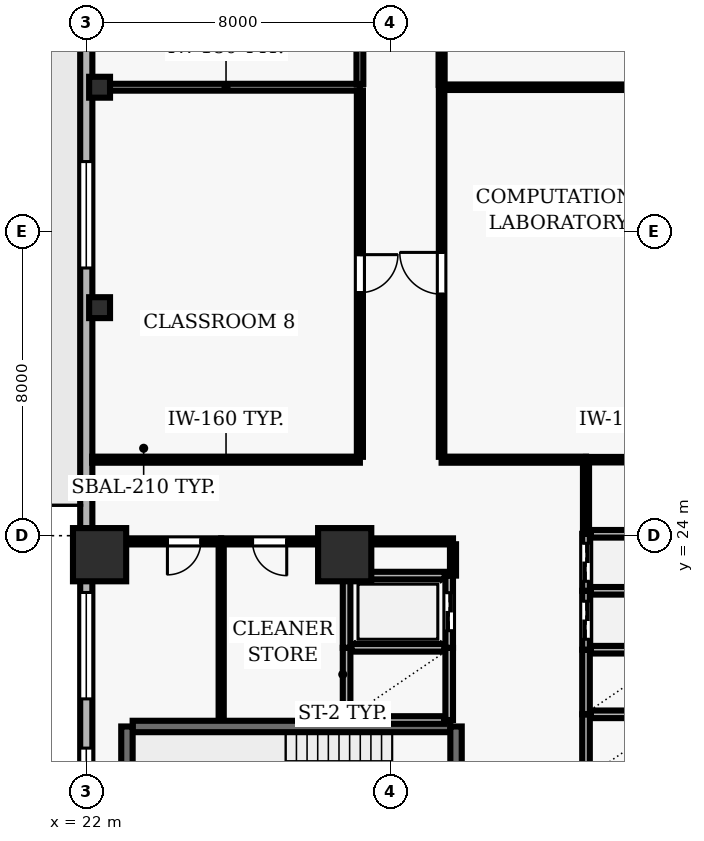
"""IFC4 building model, lengths in metres.
Left out: names, types, materials, properties, quantities, classifications, styles, units other than length and angle.
Written with IfcOpenShell. Run it as: python <this file> out.ifc"""

import sys

from ifc_helpers import new_model, si_unit, direction, frame, frame_2d, origin, origin_2d, place, context, subcontext, project, spatial, rectangle, hollow_rectangle, extrude, element, fill, save


model = new_model("IFC4")
c1 = context("Model", 3, precision=1e-05, world=origin(), true_north=direction((0.0, 1.0)))
c2 = subcontext(c1, "Body", "Model", "MODEL_VIEW")
j1 = project(units=[si_unit("LENGTHUNIT", "METRE"), si_unit("PLANEANGLEUNIT", "RADIAN")], contexts=[c1])
p1 = place(None, origin())
s1 = spatial("IfcSite", under=j1, at=p1, CompositionType="ELEMENT")
p2 = place(p1, origin())
s2 = spatial("IfcBuilding", under=s1, at=p2, CompositionType="ELEMENT")
p3 = place(p2, frame((0.0, 0.0, 38.8)))
s3 = spatial("IfcBuildingStorey", under=s2, at=p3, CompositionType="ELEMENT", Elevation=38.8)
for number, where, z_axis, x_axis in (
    (1, (22.35, 23.5, 0.0), (0.0, 0.0, 1.0), (1.0, 0.0, 0.0)),
    (2, (28.8, 23.5, 0.0), (0.0, 0.0, 1.0), (1.0, 0.0, 0.0)),
):
    element("IfcColumn", number, at=place(p3, frame(where, z_axis=z_axis, x_axis=x_axis)), inside=s3, PredefinedType="COLUMN", context=c2, shape_type="SweptSolid", body=[
        extrude(rectangle(XDim=1.4, YDim=1.4, at=origin_2d()), origin(), (0.0, 0.0, 1.0), 3.9),
    ])
for number, where, z_axis, x_axis in (
    (3, (22.35, 30.0, 0.0), (0.0, 0.0, 1.0), (1.0, 0.0, 0.0)),
    (4, (22.35, 35.8, 0.0), (0.0, 0.0, 1.0), (1.0, 0.0, 0.0)),
):
    element("IfcColumn", number, at=place(p3, frame(where, z_axis=z_axis, x_axis=x_axis)), inside=s3, PredefinedType="COLUMN", context=c2, shape_type="SweptSolid", body=[
        extrude(hollow_rectangle(XDim=0.55, YDim=0.55, WallThickness=0.025, at=origin_2d()), origin(), (0.0, 0.0, 1.0), 3.9),
    ])
p4 = place(p3, frame((22.0, 51.5, 0.0), z_axis=(0.0, 0.0, 1.0), x_axis=(0.0, -1.0, 0.0)))
e5 = element("IfcWall", 5, at=p4, inside=s3, PredefinedType="SOLIDWALL", context=c2, shape_type="SweptSolid", body=[
    extrude(rectangle(XDim=49.0, YDim=0.32, at=frame_2d((24.5, 0.0))), origin(), (0.0, 0.0, 1.0), 3.69),
])
p5 = place(p4, frame((12.1, 0.0, 0.0)))
e6 = element("IfcOpeningElement", 6, at=p5, cuts=e5, PredefinedType="OPENING", context=c2, shape_type="SweptSolid", body=[
    extrude(rectangle(XDim=1.0, YDim=2.2, at=frame_2d((0.5, 1.1))), frame((0.0, 0.17, 0.0), z_axis=(0.0, -1.0, 0.0), x_axis=(1.0, 0.0, 0.0)), (0.0, 0.0, 1.0), 0.34),
])
p6 = place(p4, frame((1.322, 0.0, 0.9)))
e7 = element("IfcOpeningElement", 7, at=p6, cuts=e5, PredefinedType="OPENING", context=c2, shape_type="SweptSolid", body=[
    extrude(rectangle(XDim=2.8, YDim=1.8, at=frame_2d((1.4, 0.9))), frame((0.0, 0.17, 0.0), z_axis=(0.0, -1.0, 0.0), x_axis=(1.0, 0.0, 0.0)), (0.0, 0.0, 1.0), 0.34),
])
p7 = place(p4, frame((17.656, 0.0, 0.9)))
e8 = element("IfcOpeningElement", 8, at=p7, cuts=e5, PredefinedType="OPENING", context=c2, shape_type="SweptSolid", body=[
    extrude(rectangle(XDim=2.8, YDim=1.8, at=frame_2d((1.4, 0.9))), frame((0.0, 0.17, 0.0), z_axis=(0.0, -1.0, 0.0), x_axis=(1.0, 0.0, 0.0)), (0.0, 0.0, 1.0), 0.34),
])
p8 = place(p4, frame((28.994, 0.0, 0.9)))
e9 = element("IfcOpeningElement", 9, at=p8, cuts=e5, PredefinedType="OPENING", context=c2, shape_type="SweptSolid", body=[
    extrude(rectangle(XDim=2.8, YDim=1.8, at=frame_2d((1.4, 0.9))), frame((0.0, 0.17, 0.0), z_axis=(0.0, -1.0, 0.0), x_axis=(1.0, 0.0, 0.0)), (0.0, 0.0, 1.0), 0.34),
])
p9 = place(p4, frame((33.089, 0.0, 0.9)))
e10 = element("IfcOpeningElement", 10, at=p9, cuts=e5, PredefinedType="OPENING", context=c2, shape_type="SweptSolid", body=[
    extrude(rectangle(XDim=2.8, YDim=1.8, at=frame_2d((1.4, 0.9))), frame((0.0, 0.17, 0.0), z_axis=(0.0, -1.0, 0.0), x_axis=(1.0, 0.0, 0.0)), (0.0, 0.0, 1.0), 0.34),
])
p10 = place(p4, frame((39.433, 0.0, 0.9)))
e11 = element("IfcOpeningElement", 11, at=p10, cuts=e5, PredefinedType="OPENING", context=c2, shape_type="SweptSolid", body=[
    extrude(rectangle(XDim=2.8, YDim=1.8, at=frame_2d((1.4, 0.9))), frame((0.0, 0.17, 0.0), z_axis=(0.0, -1.0, 0.0), x_axis=(1.0, 0.0, 0.0)), (0.0, 0.0, 1.0), 0.34),
])
p11 = place(p3, frame((31.58, 18.98, 0.0), z_axis=(0.0, 0.0, 1.0), x_axis=(-1.0, 0.0, 0.0)))
e12 = element("IfcWall", 12, at=p11, inside=s3, PredefinedType="SHEAR", context=c2, shape_type="SweptSolid", body=[
    extrude(rectangle(XDim=8.36, YDim=0.3, at=frame_2d((4.18, 0.0))), origin(), (0.0, 0.0, 1.0), 3.69),
])
p12 = place(p3, frame((23.07, 18.98, 0.0), z_axis=(0.0, 0.0, 1.0), x_axis=(0.0, -1.0, 0.0)))
e13 = element("IfcWall", 13, at=p12, inside=s3, PredefinedType="SHEAR", context=c2, shape_type="SweptSolid", body=[
    extrude(rectangle(XDim=3.51, YDim=0.3, at=frame_2d((1.755, 0.0))), origin(), (0.0, 0.0, 1.0), 3.69),
])
p13 = place(p3, frame((31.73, 15.47, 0.0), z_axis=(0.0, 0.0, 1.0), x_axis=(0.0, 1.0, 0.0)))
e14 = element("IfcWall", 14, at=p13, inside=s3, PredefinedType="SHEAR", context=c2, shape_type="SweptSolid", body=[
    extrude(rectangle(XDim=3.51, YDim=0.3, at=frame_2d((1.755, 0.0))), origin(), (0.0, 0.0, 1.0), 3.69),
])
p14 = place(p13, frame((1.18, 0.0, 0.0)))
e15 = element("IfcOpeningElement", 15, at=p14, cuts=e14, PredefinedType="OPENING", context=c2, shape_type="SweptSolid", body=[
    extrude(rectangle(XDim=1.15, YDim=2.15, at=frame_2d((0.575, 1.075))), frame((0.0, 0.16, 0.0), z_axis=(0.0, -1.0, 0.0), x_axis=(1.0, 0.0, 0.0)), (0.0, 0.0, 1.0), 0.32),
])
p15 = place(p3, frame((35.15, 19.3, 0.0), z_axis=(0.0, 0.0, 1.0), x_axis=(0.0, -1.0, 0.0)))
e16 = element("IfcWall", 16, at=p15, inside=s3, PredefinedType="SOLIDWALL", context=c2, shape_type="SweptSolid", body=[
    extrude(rectangle(XDim=1.7, YDim=0.2, at=frame_2d((0.85, 0.0))), origin(), (0.0, 0.0, 1.0), 3.69),
])
p16 = place(p3, frame((37.42, 19.3, 0.0), z_axis=(0.0, 0.0, 1.0), x_axis=(-1.0, 0.0, 0.0)))
e17 = element("IfcWall", 17, at=p16, inside=s3, PredefinedType="SOLIDWALL", context=c2, shape_type="SweptSolid", body=[
    extrude(rectangle(XDim=2.14, YDim=0.2, at=frame_2d((1.07, 0.0))), origin(), (0.0, 0.0, 1.0), 3.69),
])
p17 = place(p3, frame((35.15, 21.0, 0.0), z_axis=(0.0, 0.0, 1.0), x_axis=(0.0, -1.0, 0.0)))
e18 = element("IfcWall", 18, at=p17, inside=s3, PredefinedType="SOLIDWALL", context=c2, shape_type="SweptSolid", body=[
    extrude(rectangle(XDim=1.7, YDim=0.2, at=frame_2d((0.85, 0.0))), origin(), (0.0, 0.0, 1.0), 3.69),
])
p18 = place(p3, frame((37.42, 21.0, 0.0), z_axis=(0.0, 0.0, 1.0), x_axis=(-1.0, 0.0, 0.0)))
e19 = element("IfcWall", 19, at=p18, inside=s3, PredefinedType="SOLIDWALL", context=c2, shape_type="SweptSolid", body=[
    extrude(rectangle(XDim=2.14, YDim=0.2, at=frame_2d((1.07, 0.0))), origin(), (0.0, 0.0, 1.0), 3.69),
])
for number, where, z_axis, x_axis in (
    (20, (28.85, 21.05, 0.0), (0.0, 0.0, 1.0), (0.0, -1.0, 0.0)),
    (21, (31.55, 19.15, 0.0), (0.0, 0.0, 1.0), (0.0, 1.0, 0.0)),
):
    element("IfcWall", number, at=place(p3, frame(where, z_axis=z_axis, x_axis=x_axis)), inside=s3, PredefinedType="SOLIDWALL", context=c2, shape_type="SweptSolid", body=[
        extrude(rectangle(XDim=1.9, YDim=0.2, at=frame_2d((0.95, 0.0))), origin(), (0.0, 0.0, 1.0), 3.69),
    ])
for number, where, z_axis, x_axis in (
    (22, (28.98, 19.15, 0.0), (0.0, 0.0, 1.0), (1.0, 0.0, 0.0)),
    (23, (31.42, 21.05, 0.0), (0.0, 0.0, 1.0), (-1.0, 0.0, 0.0)),
):
    element("IfcWall", number, at=place(p3, frame(where, z_axis=z_axis, x_axis=x_axis)), inside=s3, PredefinedType="SOLIDWALL", context=c2, shape_type="SweptSolid", body=[
        extrude(rectangle(XDim=2.44, YDim=0.2, at=frame_2d((1.22, 0.0))), origin(), (0.0, 0.0, 1.0), 3.69),
    ])
p19 = place(p3, frame((35.15, 22.55, 0.0), z_axis=(0.0, 0.0, 1.0), x_axis=(0.0, -1.0, 0.0)))
e24 = element("IfcWall", 24, at=p19, inside=s3, PredefinedType="SOLIDWALL", context=c2, shape_type="SweptSolid", body=[
    extrude(rectangle(XDim=1.55, YDim=0.2, at=frame_2d((0.775, 0.0))), origin(), (0.0, 0.0, 1.0), 3.69),
])
p20 = place(p19, frame((0.275, 0.0, 0.0)))
e25 = element("IfcOpeningElement", 25, at=p20, cuts=e24, PredefinedType="OPENING", context=c2, shape_type="SweptSolid", body=[
    extrude(rectangle(XDim=1.0, YDim=2.1, at=frame_2d((0.5, 1.05))), frame((0.0, 0.11, 0.0), z_axis=(0.0, -1.0, 0.0), x_axis=(1.0, 0.0, 0.0)), (0.0, 0.0, 1.0), 0.22),
])
p21 = place(p3, frame((37.42, 22.55, 0.0), z_axis=(0.0, 0.0, 1.0), x_axis=(-1.0, 0.0, 0.0)))
e26 = element("IfcWall", 26, at=p21, inside=s3, PredefinedType="SOLIDWALL", context=c2, shape_type="SweptSolid", body=[
    extrude(rectangle(XDim=2.14, YDim=0.2, at=frame_2d((1.07, 0.0))), origin(), (0.0, 0.0, 1.0), 3.69),
])
p22 = place(p3, frame((35.15, 24.05, 0.0), z_axis=(0.0, 0.0, 1.0), x_axis=(0.0, -1.0, 0.0)))
e27 = element("IfcWall", 27, at=p22, inside=s3, PredefinedType="SOLIDWALL", context=c2, shape_type="SweptSolid", body=[
    extrude(rectangle(XDim=1.5, YDim=0.2, at=frame_2d((0.75, 0.0))), origin(), (0.0, 0.0, 1.0), 3.69),
])
p23 = place(p22, frame((0.25, 0.0, 0.0)))
e28 = element("IfcOpeningElement", 28, at=p23, cuts=e27, PredefinedType="OPENING", context=c2, shape_type="SweptSolid", body=[
    extrude(rectangle(XDim=1.0, YDim=2.1, at=frame_2d((0.5, 1.05))), frame((0.0, 0.11, 0.0), z_axis=(0.0, -1.0, 0.0), x_axis=(1.0, 0.0, 0.0)), (0.0, 0.0, 1.0), 0.22),
])
p24 = place(p3, frame((37.42, 24.05, 0.0), z_axis=(0.0, 0.0, 1.0), x_axis=(-1.0, 0.0, 0.0)))
e29 = element("IfcWall", 29, at=p24, inside=s3, PredefinedType="SOLIDWALL", context=c2, shape_type="SweptSolid", body=[
    extrude(rectangle(XDim=2.14, YDim=0.2, at=frame_2d((1.07, 0.0))), origin(), (0.0, 0.0, 1.0), 3.69),
])
p25 = place(p3, frame((28.85, 22.95, 0.0), z_axis=(0.0, 0.0, 1.0), x_axis=(0.0, -1.0, 0.0)))
e30 = element("IfcWall", 30, at=p25, inside=s3, PredefinedType="SOLIDWALL", context=c2, shape_type="SweptSolid", body=[
    extrude(rectangle(XDim=1.9, YDim=0.2, at=frame_2d((0.95, 0.0))), origin(), (0.0, 0.0, 1.0), 3.69),
])
p26 = place(p3, frame((31.55, 21.05, 0.0), z_axis=(0.0, 0.0, 1.0), x_axis=(0.0, 1.0, 0.0)))
e31 = element("IfcWall", 31, at=p26, inside=s3, PredefinedType="SOLIDWALL", context=c2, shape_type="SweptSolid", body=[
    extrude(rectangle(XDim=1.9, YDim=0.2, at=frame_2d((0.95, 0.0))), origin(), (0.0, 0.0, 1.0), 3.69),
])
p27 = place(p26, frame((0.45, 0.0, 0.0)))
e32 = element("IfcOpeningElement", 32, at=p27, cuts=e31, PredefinedType="OPENING", context=c2, shape_type="SweptSolid", body=[
    extrude(rectangle(XDim=1.0, YDim=2.1, at=frame_2d((0.5, 1.05))), frame((0.0, 0.11, 0.0), z_axis=(0.0, -1.0, 0.0), x_axis=(1.0, 0.0, 0.0)), (0.0, 0.0, 1.0), 0.22),
])
p28 = place(p3, frame((31.43, 22.95, 0.0), z_axis=(0.0, 0.0, 1.0), x_axis=(-1.0, 0.0, 0.0)))
e33 = element("IfcWall", 33, at=p28, inside=s3, PredefinedType="SOLIDWALL", context=c2, shape_type="SweptSolid", body=[
    extrude(rectangle(XDim=2.46, YDim=0.2, at=frame_2d((1.23, 0.0))), origin(), (0.0, 0.0, 1.0), 3.69),
])
p29 = place(p3, frame((25.55, 23.85, 0.0), z_axis=(0.0, 0.0, 1.0), x_axis=(-1.0, 0.0, 0.0)))
e34 = element("IfcWall", 34, at=p29, inside=s3, PredefinedType="PARTITIONING", context=c2, shape_type="SweptSolid", body=[
    extrude(rectangle(XDim=3.35, YDim=0.16, at=frame_2d((1.675, 0.0))), origin(), (0.0, 0.0, 1.0), 2.995),
])
p30 = place(p29, frame((0.535, 0.0, 0.0)))
e35 = element("IfcOpeningElement", 35, at=p30, cuts=e34, PredefinedType="OPENING", context=c2, shape_type="SweptSolid", body=[
    extrude(rectangle(XDim=0.88, YDim=2.1, at=frame_2d((0.44, 1.05))), frame((0.0, 0.09, 0.0), z_axis=(0.0, -1.0, 0.0), x_axis=(1.0, 0.0, 0.0)), (0.0, 0.0, 1.0), 0.18),
])
p31 = place(p3, frame((28.8, 23.85, 0.0), z_axis=(0.0, 0.0, 1.0), x_axis=(-1.0, 0.0, 0.0)))
e36 = element("IfcWall", 36, at=p31, inside=s3, PredefinedType="PARTITIONING", context=c2, shape_type="SweptSolid", body=[
    extrude(rectangle(XDim=3.25, YDim=0.16, at=frame_2d((1.625, 0.0))), origin(), (0.0, 0.0, 1.0), 2.995),
])
p32 = place(p31, frame((1.525, 0.0, 0.0)))
e37 = element("IfcOpeningElement", 37, at=p32, cuts=e36, PredefinedType="OPENING", context=c2, shape_type="SweptSolid", body=[
    extrude(rectangle(XDim=0.9, YDim=2.1, at=frame_2d((0.45, 1.05))), frame((0.0, 0.09, 0.0), z_axis=(0.0, -1.0, 0.0), x_axis=(1.0, 0.0, 0.0)), (0.0, 0.0, 1.0), 0.18),
])
p33 = place(p3, frame((28.8, 23.85, 0.0), z_axis=(0.0, 0.0, 1.0), x_axis=(1.0, 0.0, 0.0)))
e38 = element("IfcWall", 38, at=p33, inside=s3, PredefinedType="PARTITIONING", context=c2, shape_type="SweptSolid", body=[
    extrude(rectangle(XDim=2.85, YDim=0.16, at=frame_2d((1.425, 0.0))), origin(), (0.0, 0.0, 1.0), 3.69),
])
p34 = place(p3, frame((29.2, 26.0, 0.0), z_axis=(0.0, 0.0, 1.0), x_axis=(-1.0, 0.0, 0.0)))
e39 = element("IfcWall", 39, at=p34, inside=s3, PredefinedType="PARTITIONING", context=c2, shape_type="SweptSolid", body=[
    extrude(rectangle(XDim=7.045, YDim=0.16, at=frame_2d((3.522, 0.0))), origin(), (0.0, 0.0, 1.0), 3.69),
])
p35 = place(p3, frame((29.2, 35.8, 0.0), z_axis=(0.0, 0.0, 1.0), x_axis=(-1.0, 0.0, 0.0)))
e40 = element("IfcWall", 40, at=p35, inside=s3, PredefinedType="PARTITIONING", context=c2, shape_type="SweptSolid", body=[
    extrude(rectangle(XDim=7.045, YDim=0.18, at=frame_2d((3.522, 0.0))), origin(), (0.0, 0.0, 1.0), 2.995),
])
p36 = place(p3, frame((35.15, 26.0, 0.0), z_axis=(0.0, 0.0, 1.0), x_axis=(-1.0, 0.0, 0.0)))
e41 = element("IfcWall", 41, at=p36, inside=s3, PredefinedType="PARTITIONING", context=c2, shape_type="SweptSolid", body=[
    extrude(rectangle(XDim=3.8, YDim=0.16, at=frame_2d((1.9, 0.0))), origin(), (0.0, 0.0, 1.0), 3.69),
])
p37 = place(p3, frame((35.15, 26.0, 0.0), z_axis=(0.0, 0.0, 1.0), x_axis=(1.0, 0.0, 0.0)))
e42 = element("IfcWall", 42, at=p37, inside=s3, PredefinedType="PARTITIONING", context=c2, shape_type="SweptSolid", body=[
    extrude(rectangle(XDim=2.7, YDim=0.145, at=frame_2d((1.35, 0.0))), origin(), (0.0, 0.0, 1.0), 3.69),
])
p38 = place(p3, frame((37.845, 35.8, 0.0), z_axis=(0.0, 0.0, 1.0), x_axis=(-1.0, 0.0, 0.0)))
e43 = element("IfcWall", 43, at=p38, inside=s3, PredefinedType="PARTITIONING", context=c2, shape_type="SweptSolid", body=[
    extrude(rectangle(XDim=6.495, YDim=0.145, at=frame_2d((3.248, 0.0))), origin(), (0.0, 0.0, 1.0), 2.995),
])
p39 = place(p3, frame((25.55, 19.16, 0.0), z_axis=(0.0, 0.0, 1.0), x_axis=(0.0, 1.0, 0.0)))
e44 = element("IfcWall", 44, at=p39, inside=s3, PredefinedType="PARTITIONING", context=c2, shape_type="SweptSolid", body=[
    extrude(rectangle(XDim=4.615, YDim=0.135, at=frame_2d((2.308, 0.0))), origin(), (0.0, 0.0, 1.0), 3.69),
])
p40 = place(p3, frame((28.8, 22.95, 0.0), z_axis=(0.0, 0.0, 1.0), x_axis=(0.0, 1.0, 0.0)))
e45 = element("IfcWall", 45, at=p40, inside=s3, PredefinedType="PARTITIONING", context=c2, shape_type="SweptSolid", body=[
    extrude(rectangle(XDim=0.825, YDim=0.125, at=frame_2d((0.413, 0.0))), origin(), (0.0, 0.0, 1.0), 3.69),
])
p41 = place(p3, frame((29.2, 35.715, 0.0), z_axis=(0.0, 0.0, 1.0), x_axis=(0.0, -1.0, 0.0)))
e46 = element("IfcWall", 46, at=p41, inside=s3, PredefinedType="PARTITIONING", context=c2, shape_type="SweptSolid", body=[
    extrude(rectangle(XDim=9.64, YDim=0.16, at=frame_2d((4.82, 0.0))), origin(), (0.0, 0.0, 1.0), 3.69),
])
p42 = place(p41, frame((4.32, 0.0, 0.0)))
e47 = element("IfcOpeningElement", 47, at=p42, cuts=e46, PredefinedType="OPENING", context=c2, shape_type="SweptSolid", body=[
    extrude(rectangle(XDim=1.0, YDim=2.1, at=frame_2d((0.5, 1.05))), frame((0.0, 0.09, 0.0), z_axis=(0.0, -1.0, 0.0), x_axis=(1.0, 0.0, 0.0)), (0.0, 0.0, 1.0), 0.18),
])
p43 = place(p3, frame((29.2, 44.955, 0.0), z_axis=(0.0, 0.0, 1.0), x_axis=(0.0, -1.0, 0.0)))
e48 = element("IfcWall", 48, at=p43, inside=s3, PredefinedType="PARTITIONING", context=c2, shape_type="SweptSolid", body=[
    extrude(rectangle(XDim=9.07, YDim=0.18, at=frame_2d((4.535, 0.0))), origin(), (0.0, 0.0, 1.0), 3.69),
])
p44 = place(p43, frame((4.06, 0.0, 0.0)))
e49 = element("IfcOpeningElement", 49, at=p44, cuts=e48, PredefinedType="OPENING", context=c2, shape_type="SweptSolid", body=[
    extrude(rectangle(XDim=0.95, YDim=2.1, at=frame_2d((0.475, 1.05))), frame((0.0, 0.1, 0.0), z_axis=(0.0, -1.0, 0.0), x_axis=(1.0, 0.0, 0.0)), (0.0, 0.0, 1.0), 0.2),
])
p45 = place(p3, frame((31.35, 26.075, 0.0), z_axis=(0.0, 0.0, 1.0), x_axis=(0.0, 1.0, 0.0)))
e50 = element("IfcWall", 50, at=p45, inside=s3, PredefinedType="PARTITIONING", context=c2, shape_type="SweptSolid", body=[
    extrude(rectangle(XDim=9.657, YDim=0.145, at=frame_2d((4.829, 0.0))), origin(), (0.0, 0.0, 1.0), 3.69),
])
p46 = place(p45, frame((4.279, 0.0, 0.0)))
e51 = element("IfcOpeningElement", 51, at=p46, cuts=e50, PredefinedType="OPENING", context=c2, shape_type="SweptSolid", body=[
    extrude(rectangle(XDim=1.1, YDim=2.15, at=frame_2d((0.55, 1.075))), frame((0.0, 0.083, 0.0), z_axis=(0.0, -1.0, 0.0), x_axis=(1.0, 0.0, 0.0)), (0.0, 0.0, 1.0), 0.165),
])
p47 = place(p3, frame((31.35, 35.867, 0.0), z_axis=(0.0, 0.0, 1.0), x_axis=(0.0, 1.0, 0.0)))
e52 = element("IfcWall", 52, at=p47, inside=s3, PredefinedType="PARTITIONING", context=c2, shape_type="SweptSolid", body=[
    extrude(rectangle(XDim=9.116, YDim=0.16, at=frame_2d((4.558, 0.0))), origin(), (0.0, 0.0, 1.0), 3.69),
])
p48 = place(p47, frame((4.108, 0.0, 0.0)))
e53 = element("IfcOpeningElement", 53, at=p48, cuts=e52, PredefinedType="OPENING", context=c2, shape_type="SweptSolid", body=[
    extrude(rectangle(XDim=0.9, YDim=2.1, at=frame_2d((0.45, 1.05))), frame((0.0, 0.09, 0.0), z_axis=(0.0, -1.0, 0.0), x_axis=(1.0, 0.0, 0.0)), (0.0, 0.0, 1.0), 0.18),
])
p49 = place(p3, frame((31.65, 23.775, 0.0), z_axis=(0.0, 0.0, 1.0), x_axis=(0.0, -1.0, 0.0)))
e54 = element("IfcWall", 54, at=p49, inside=s3, PredefinedType="PARTITIONING", context=c2, shape_type="SweptSolid", body=[
    extrude(rectangle(XDim=0.825, YDim=0.16, at=frame_2d((0.413, 0.0))), origin(), (0.0, 0.0, 1.0), 3.69),
])
p50 = place(p3, frame((35.15, 24.07, 0.0), z_axis=(0.0, 0.0, 1.0), x_axis=(0.0, 1.0, 0.0)))
e55 = element("IfcWall", 55, at=p50, inside=s3, PredefinedType="PARTITIONING", context=c2, shape_type="SweptSolid", body=[
    extrude(rectangle(XDim=1.855, YDim=0.16, at=frame_2d((0.927, 0.0))), origin(), (0.0, 0.0, 1.0), 3.69),
])
p51 = place(p7, origin())
e56 = element("IfcWindow", 56, at=p51, inside=s3, PartitioningType="SINGLE_PANEL", PredefinedType="WINDOW", context=c2, shape_type="SweptSolid", body=[
    extrude(rectangle(XDim=2.8, YDim=1.8, at=frame_2d((1.4, 0.9))), frame((0.0, 0.03, 0.0), z_axis=(0.0, -1.0, 0.0), x_axis=(1.0, 0.0, 0.0)), (0.0, 0.0, 1.0), 0.06),
])
fill(e8, e56)
p52 = place(p8, origin())
e57 = element("IfcWindow", 57, at=p52, inside=s3, PartitioningType="SINGLE_PANEL", PredefinedType="WINDOW", context=c2, shape_type="SweptSolid", body=[
    extrude(rectangle(XDim=2.8, YDim=1.8, at=frame_2d((1.4, 0.9))), frame((0.0, 0.03, 0.0), z_axis=(0.0, -1.0, 0.0), x_axis=(1.0, 0.0, 0.0)), (0.0, 0.0, 1.0), 0.06),
])
fill(e9, e57)
p53 = place(p9, origin())
e58 = element("IfcWindow", 58, at=p53, inside=s3, PartitioningType="SINGLE_PANEL", PredefinedType="WINDOW", context=c2, shape_type="SweptSolid", body=[
    extrude(rectangle(XDim=2.8, YDim=1.8, at=frame_2d((1.4, 0.9))), frame((0.0, 0.03, 0.0), z_axis=(0.0, -1.0, 0.0), x_axis=(1.0, 0.0, 0.0)), (0.0, 0.0, 1.0), 0.06),
])
fill(e10, e58)
p54 = place(p20, origin())
e59 = element("IfcDoor", 59, at=p54, inside=s3, OperationType="DOUBLE_DOOR_SLIDING", PredefinedType="DOOR", context=c2, shape_type="SweptSolid", body=[
    extrude(rectangle(XDim=1.0, YDim=2.1, at=frame_2d((0.5, 1.05))), frame((0.0, 0.025, 0.0), z_axis=(0.0, -1.0, 0.0), x_axis=(1.0, 0.0, 0.0)), (0.0, 0.0, 1.0), 0.05),
])
fill(e25, e59)
p55 = place(p23, origin())
e60 = element("IfcDoor", 60, at=p55, inside=s3, OperationType="DOUBLE_DOOR_SLIDING", PredefinedType="DOOR", context=c2, shape_type="SweptSolid", body=[
    extrude(rectangle(XDim=1.0, YDim=2.1, at=frame_2d((0.5, 1.05))), frame((0.0, 0.025, 0.0), z_axis=(0.0, -1.0, 0.0), x_axis=(1.0, 0.0, 0.0)), (0.0, 0.0, 1.0), 0.05),
])
fill(e28, e60)
p56 = place(p27, origin())
e61 = element("IfcDoor", 61, at=p56, inside=s3, OperationType="DOUBLE_DOOR_SLIDING", PredefinedType="DOOR", context=c2, shape_type="SweptSolid", body=[
    extrude(rectangle(XDim=1.0, YDim=2.1, at=frame_2d((0.5, 1.05))), frame((0.0, 0.025, 0.0), z_axis=(0.0, -1.0, 0.0), x_axis=(1.0, 0.0, 0.0)), (0.0, 0.0, 1.0), 0.05),
])
fill(e32, e61)
p57 = place(p30, origin())
e62 = element("IfcDoor", 62, at=p57, inside=s3, OperationType="SINGLE_SWING_RIGHT", PredefinedType="DOOR", context=c2, shape_type="SweptSolid", body=[
    extrude(rectangle(XDim=0.88, YDim=2.1, at=frame_2d((0.44, 1.05))), frame((0.0, 0.025, 0.0), z_axis=(0.0, -1.0, 0.0), x_axis=(1.0, 0.0, 0.0)), (0.0, 0.0, 1.0), 0.05),
])
fill(e35, e62)
p58 = place(p32, origin())
e63 = element("IfcDoor", 63, at=p58, inside=s3, OperationType="SINGLE_SWING_LEFT", PredefinedType="DOOR", context=c2, shape_type="SweptSolid", body=[
    extrude(rectangle(XDim=0.9, YDim=2.1, at=frame_2d((0.45, 1.05))), frame((0.0, 0.025, 0.0), z_axis=(0.0, -1.0, 0.0), x_axis=(1.0, 0.0, 0.0)), (0.0, 0.0, 1.0), 0.05),
])
fill(e37, e63)
p59 = place(p42, origin())
e64 = element("IfcDoor", 64, at=p59, inside=s3, OperationType="SINGLE_SWING_LEFT", PredefinedType="DOOR", context=c2, shape_type="SweptSolid", body=[
    extrude(rectangle(XDim=1.0, YDim=2.1, at=frame_2d((0.5, 1.05))), frame((0.0, 0.025, 0.0), z_axis=(0.0, -1.0, 0.0), x_axis=(1.0, 0.0, 0.0)), (0.0, 0.0, 1.0), 0.05),
])
fill(e47, e64)
p60 = place(p46, origin())
e65 = element("IfcDoor", 65, at=p60, inside=s3, OperationType="SINGLE_SWING_RIGHT", PredefinedType="DOOR", context=c2, shape_type="SweptSolid", body=[
    extrude(rectangle(XDim=1.1, YDim=2.15, at=frame_2d((0.55, 1.075))), frame((0.0, 0.025, 0.0), z_axis=(0.0, -1.0, 0.0), x_axis=(1.0, 0.0, 0.0)), (0.0, 0.0, 1.0), 0.05),
])
fill(e51, e65)
save(model, sys.argv[1])
